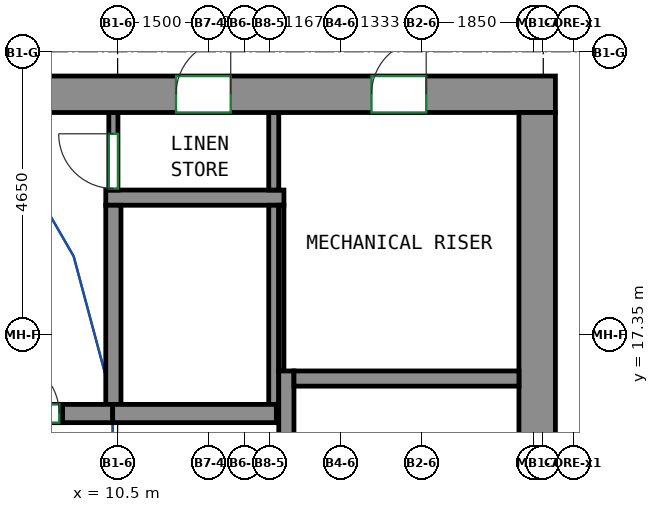
"""IFC4 building model, lengths in metres.
Left out: names, types, materials, properties, quantities, classifications, styles, units other than length and angle.
Written with IfcOpenShell. Run it as: python <this file> out.ifc"""

import sys

from ifc_helpers import new_model, si_unit, direction, frame, frame_2d, origin, place, context, subcontext, project, spatial, rectangle, extrude, source, transform, mapped, element, fill, save


model = new_model("IFC4")
c1 = context("Model", 3, precision=1e-05, world=origin(), true_north=direction((0.0, 1.0)))
c2 = subcontext(c1, "Body", "Model", "MODEL_VIEW")
j1 = project(units=[si_unit("LENGTHUNIT", "METRE"), si_unit("PLANEANGLEUNIT", "RADIAN")], contexts=[c1])
p1 = place(None, origin())
s1 = spatial("IfcSite", under=j1, at=p1, CompositionType="ELEMENT")
p2 = place(p1, origin())
s2 = spatial("IfcBuilding", under=s1, at=p2, CompositionType="ELEMENT")
p3 = place(p2, frame((0.0, 0.0, 318.8)))
s3 = spatial("IfcBuildingStorey", under=s2, at=p3, CompositionType="ELEMENT", Elevation=318.8)
m1 = source(origin(), c2, "Body", "SweptSolid", [
    extrude(rectangle(XDim=9.68, YDim=0.6, at=frame_2d((4.84, 0.0))), origin(), (0.0, 0.0, 1.0), 5.0),
])
p4 = place(p3, frame((8.02, 21.3, -0.4), z_axis=(0.0, 0.0, 1.0), x_axis=(1.0, 0.0, 0.0)))
e1 = element("IfcWall", 1, at=p4, inside=s3, PredefinedType="SHEAR", context=c2, shape_type="MappedRepresentation", body=[
    mapped(m1, transform((0.0, 0.0, 0.0))),
])
p5 = place(p4, frame((3.44, 0.0, 0.4)))
e2 = element("IfcOpeningElement", 2, at=p5, cuts=e1, PredefinedType="OPENING", context=c2, shape_type="SweptSolid", body=[
    extrude(rectangle(XDim=0.9, YDim=2.1, at=frame_2d((0.45, 1.05))), frame((0.0, 0.31, 0.0), z_axis=(0.0, -1.0, 0.0), x_axis=(1.0, 0.0, 0.0)), (0.0, 0.0, 1.0), 0.62),
])
p6 = place(p4, frame((6.655, 0.0, 0.4)))
e3 = element("IfcOpeningElement", 3, at=p6, cuts=e1, PredefinedType="OPENING", context=c2, shape_type="SweptSolid", body=[
    extrude(rectangle(XDim=0.9, YDim=2.1, at=frame_2d((0.45, 1.05))), frame((0.0, 0.31, 0.0), z_axis=(0.0, -1.0, 0.0), x_axis=(1.0, 0.0, 0.0)), (0.0, 0.0, 1.0), 0.62),
])
m2 = source(origin(), c2, "Body", "SweptSolid", [
    extrude(rectangle(XDim=12.0, YDim=0.6, at=frame_2d((6.0, 0.0))), origin(), (0.0, 0.0, 1.0), 5.0),
])
p7 = place(p3, frame((17.4, 9.0, -0.4), z_axis=(0.0, 0.0, 1.0), x_axis=(0.0, 1.0, 0.0)))
e4 = element("IfcWall", 4, at=p7, inside=s3, PredefinedType="SHEAR", context=c2, shape_type="MappedRepresentation", body=[
    mapped(m2, transform((0.0, 0.0, 0.0))),
])
m3 = source(origin(), c2, "Body", "SweptSolid", [
    extrude(rectangle(XDim=7.75, YDim=0.25, at=frame_2d((3.875, 0.0))), origin(), (0.0, 0.0, 1.0), 5.0),
])
p8 = place(p3, frame((13.275, 9.0, -0.4), z_axis=(0.0, 0.0, 1.0), x_axis=(0.0, 1.0, 0.0)))
e5 = element("IfcWall", 5, at=p8, inside=s3, PredefinedType="SHEAR", context=c2, shape_type="MappedRepresentation", body=[
    mapped(m3, transform((0.0, 0.0, 0.0))),
])
m4 = source(origin(), c2, "Body", "SweptSolid", [
    extrude(rectangle(XDim=3.7, YDim=0.25, at=frame_2d((1.85, 0.0))), origin(), (0.0, 0.0, 1.0), 5.0),
])
p9 = place(p3, frame((13.4, 16.625, -0.4), z_axis=(0.0, 0.0, 1.0), x_axis=(1.0, 0.0, 0.0)))
e6 = element("IfcWall", 6, at=p9, inside=s3, PredefinedType="SHEAR", context=c2, shape_type="MappedRepresentation", body=[
    mapped(m4, transform((0.0, 0.0, 0.0))),
])
m5 = source(origin(), c2, "Body", "SweptSolid", [
    extrude(rectangle(XDim=0.829, YDim=0.3, at=frame_2d((0.414, 0.0))), origin(), (0.0, 0.0, 1.0), 4.6),
])
p10 = place(p3, frame((9.59, 16.05, 0.0), z_axis=(0.0, 0.0, 1.0), x_axis=(1.0, 0.0, 0.0)))
e7 = element("IfcWall", 7, at=p10, inside=s3, PredefinedType="SHEAR", context=c2, shape_type="MappedRepresentation", body=[
    mapped(m5, transform((0.0, 0.0, 0.0))),
])
m6 = source(origin(), c2, "Body", "SweptSolid", [
    extrude(rectangle(XDim=2.691, YDim=0.3, at=frame_2d((1.346, 0.0))), origin(), (0.0, 0.0, 1.0), 5.0),
])
p11 = place(p3, frame((10.419, 16.05, -0.4), z_axis=(0.0, 0.0, 1.0), x_axis=(1.0, 0.0, 0.0)))
e8 = element("IfcWall", 8, at=p11, inside=s3, PredefinedType="SHEAR", context=c2, shape_type="MappedRepresentation", body=[
    mapped(m6, transform((0.0, 0.0, 0.0))),
])
m7 = source(origin(), c2, "Body", "SweptSolid", [
    extrude(rectangle(XDim=1.0, YDim=0.3, at=frame_2d((0.5, 0.0))), origin(), (0.0, 0.0, 1.0), 1.35),
])
p12 = place(p3, frame((8.59, 16.05, 3.25), z_axis=(0.0, 0.0, 1.0), x_axis=(1.0, 0.0, 0.0)))
e9 = element("IfcWall", 9, at=p12, inside=s3, PredefinedType="SHEAR", context=c2, shape_type="MappedRepresentation", body=[
    mapped(m7, transform((0.0, 0.0, 0.0))),
])
m8 = source(origin(), c2, "Body", "SweptSolid", [
    extrude(rectangle(XDim=2.93, YDim=0.25, at=frame_2d((1.465, 0.0))), origin(), (0.0, 0.0, 1.0), 4.6),
])
p13 = place(p3, frame((10.305, 19.6, 0.0), z_axis=(0.0, 0.0, 1.0), x_axis=(1.0, 0.0, 0.0)))
e10 = element("IfcWall", 10, at=p13, inside=s3, PredefinedType="PARTITIONING", context=c2, shape_type="MappedRepresentation", body=[
    mapped(m8, transform((0.0, 0.0, 0.0))),
])
m9 = source(origin(), c2, "Body", "SweptSolid", [
    extrude(rectangle(XDim=3.275, YDim=0.165, at=frame_2d((1.638, 0.0))), origin(), (0.0, 0.0, 1.0), 4.6),
])
p14 = place(p3, frame((13.067, 16.2, 0.0), z_axis=(0.0, 0.0, 1.0), x_axis=(0.0, 1.0, 0.0)))
e11 = element("IfcWall", 11, at=p14, inside=s3, PredefinedType="PARTITIONING", context=c2, shape_type="MappedRepresentation", body=[
    mapped(m9, transform((0.0, 0.0, 0.0))),
])
m10 = source(origin(), c2, "Body", "SweptSolid", [
    extrude(rectangle(XDim=1.275, YDim=0.165, at=frame_2d((0.637, 0.0))), origin(), (0.0, 0.0, 1.0), 4.6),
])
p15 = place(p3, frame((13.067, 19.725, 0.0), z_axis=(0.0, 0.0, 1.0), x_axis=(0.0, 1.0, 0.0)))
e12 = element("IfcWall", 12, at=p15, inside=s3, PredefinedType="PARTITIONING", context=c2, shape_type="MappedRepresentation", body=[
    mapped(m10, transform((0.0, 0.0, 0.0))),
])
m11 = source(origin(), c2, "Body", "SweptSolid", [
    extrude(rectangle(XDim=3.275, YDim=0.25, at=frame_2d((1.638, 0.0))), origin(), (0.0, 0.0, 1.0), 4.6),
])
p16 = place(p3, frame((10.43, 16.2, 0.0), z_axis=(0.0, 0.0, 1.0), x_axis=(0.0, 1.0, 0.0)))
e13 = element("IfcWall", 13, at=p16, inside=s3, PredefinedType="PARTITIONING", context=c2, shape_type="MappedRepresentation", body=[
    mapped(m11, transform((0.0, 0.0, 0.0))),
])
m12 = source(origin(), c2, "Body", "SweptSolid", [
    extrude(rectangle(XDim=2.725, YDim=0.085, at=frame_2d((1.363, 0.0))), origin(), (0.0, 0.0, 1.0), 4.6),
])
p17 = place(p3, frame((13.192, 16.75, 0.0), z_axis=(0.0, 0.0, 1.0), x_axis=(0.0, 1.0, 0.0)))
e14 = element("IfcWall", 14, at=p17, inside=s3, PredefinedType="PARTITIONING", context=c2, shape_type="MappedRepresentation", body=[
    mapped(m12, transform((0.0, 0.0, 0.0))),
])
m13 = source(origin(), c2, "Body", "SweptSolid", [
    extrude(rectangle(XDim=1.275, YDim=0.15, at=frame_2d((0.637, 0.0))), origin(), (0.0, 0.0, 1.0), 4.6),
])
p18 = place(p3, frame((10.43, 19.725, 0.0), z_axis=(0.0, 0.0, 1.0), x_axis=(0.0, 1.0, 0.0)))
e15 = element("IfcWall", 15, at=p18, inside=s3, PredefinedType="PARTITIONING", context=c2, shape_type="MappedRepresentation", body=[
    mapped(m13, transform((0.0, 0.0, 0.0))),
])
p19 = place(p18, frame((0.025, 0.0, 0.0)))
e16 = element("IfcOpeningElement", 16, at=p19, cuts=e15, PredefinedType="OPENING", context=c2, shape_type="SweptSolid", body=[
    extrude(rectangle(XDim=0.9, YDim=2.1, at=frame_2d((0.45, 1.05))), frame((0.0, 0.085, 0.0), z_axis=(0.0, -1.0, 0.0), x_axis=(1.0, 0.0, 0.0)), (0.0, 0.0, 1.0), 0.17),
])
m14 = source(origin(), c2, "Body", "SweptSolid", [
    extrude(rectangle(XDim=1.0, YDim=0.3, at=frame_2d((0.5, 0.0))), origin(), (0.0, 0.0, 1.0), 2.4),
])
p20 = place(p3, frame((8.59, 16.05, 0.0), z_axis=(0.0, 0.0, 1.0), x_axis=(1.0, 0.0, 0.0)))
e17 = element("IfcWall", 17, at=p20, inside=s3, PredefinedType="PARTITIONING", context=c2, shape_type="MappedRepresentation", body=[
    mapped(m14, transform((0.0, 0.0, 0.0))),
])
p21 = place(p20, frame((0.05, 0.0, 0.0)))
e18 = element("IfcOpeningElement", 18, at=p21, cuts=e17, PredefinedType="OPENING", context=c2, shape_type="SweptSolid", body=[
    extrude(rectangle(XDim=0.9, YDim=2.1, at=frame_2d((0.45, 1.05))), frame((0.0, 0.16, 0.0), z_axis=(0.0, -1.0, 0.0), x_axis=(1.0, 0.0, 0.0)), (0.0, 0.0, 1.0), 0.32),
])
p22 = place(p5, origin())
e19 = element("IfcDoor", 19, at=p22, inside=s3, OperationType="SINGLE_SWING_RIGHT", PredefinedType="DOOR", context=c2, shape_type="SweptSolid", body=[
    extrude(rectangle(XDim=0.9, YDim=2.1, at=frame_2d((0.45, 1.05))), frame((0.0, -0.155, 0.0), z_axis=(0.0, -1.0, 0.0), x_axis=(1.0, 0.0, 0.0)), (0.0, 0.0, 1.0), 0.05),
])
fill(e2, e19)
p23 = place(p19, origin())
e20 = element("IfcDoor", 20, at=p23, inside=s3, OperationType="SINGLE_SWING_RIGHT", PredefinedType="DOOR", context=c2, shape_type="SweptSolid", body=[
    extrude(rectangle(XDim=0.9, YDim=2.1, at=frame_2d((0.45, 1.05))), frame((0.0, 0.025, 0.0), z_axis=(0.0, -1.0, 0.0), x_axis=(1.0, 0.0, 0.0)), (0.0, 0.0, 1.0), 0.05),
])
fill(e16, e20)
p24 = place(p6, origin())
e21 = element("IfcDoor", 21, at=p24, inside=s3, OperationType="SINGLE_SWING_RIGHT", PredefinedType="DOOR", context=c2, shape_type="SweptSolid", body=[
    extrude(rectangle(XDim=0.9, YDim=2.1, at=frame_2d((0.45, 1.05))), frame((0.0, -0.155, 0.0), z_axis=(0.0, -1.0, 0.0), x_axis=(1.0, 0.0, 0.0)), (0.0, 0.0, 1.0), 0.05),
])
fill(e3, e21)
p25 = place(p21, origin())
e22 = element("IfcDoor", 22, at=p25, inside=s3, OperationType="SINGLE_SWING_LEFT", PredefinedType="DOOR", context=c2, shape_type="SweptSolid", body=[
    extrude(rectangle(XDim=0.9, YDim=2.1, at=frame_2d((0.45, 1.05))), frame((0.0, 0.025, 0.0), z_axis=(0.0, -1.0, 0.0), x_axis=(1.0, 0.0, 0.0)), (0.0, 0.0, 1.0), 0.05),
])
fill(e18, e22)
save(model, sys.argv[1])
